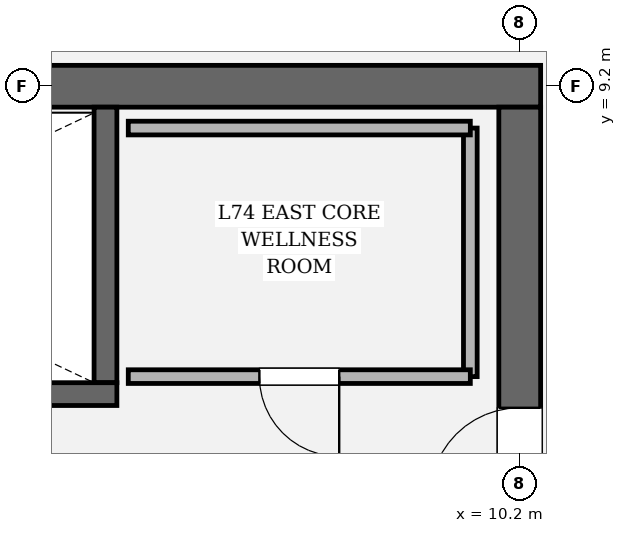
"""IFC4 building model, lengths in metres.
Left out: names, types, materials, properties, quantities, classifications, styles, units other than length and angle.
Written with IfcOpenShell. Run it as: python <this file> out.ifc"""

import sys

from ifc_helpers import new_model, si_unit, direction, frame, frame_2d, origin, place, context, subcontext, project, spatial, rectangle, extrude, element, fill, save


model = new_model("IFC4")
c1 = context("Model", 3, precision=1e-05, world=origin(), true_north=direction((0.0, 1.0)))
c2 = subcontext(c1, "Body", "Model", "MODEL_VIEW")
j1 = project(units=[si_unit("LENGTHUNIT", "METRE"), si_unit("PLANEANGLEUNIT", "RADIAN")], contexts=[c1])
p1 = place(None, origin())
s1 = spatial("IfcSite", under=j1, at=p1, CompositionType="ELEMENT")
p2 = place(p1, origin())
s2 = spatial("IfcBuilding", under=s1, at=p2, CompositionType="ELEMENT")
p3 = place(p2, frame((0.0, 0.0, 313.2)))
s3 = spatial("IfcBuildingStorey", under=s2, at=p3, CompositionType="ELEMENT", Elevation=313.2)
p4 = place(p3, frame((-10.475, 9.2, 0.0), z_axis=(0.0, 0.0, 1.0), x_axis=(1.0, 0.0, 0.0)))
e1 = element("IfcWall", 1, at=p4, inside=s3, PredefinedType="SHEAR", context=c2, shape_type="SweptSolid", body=[
    extrude(rectangle(XDim=20.95, YDim=0.55, at=frame_2d((10.475, 0.0))), origin(), (0.0, 0.0, 1.0), 4.2),
])
p5 = place(p3, frame((10.2, 8.925, 0.0), z_axis=(0.0, 0.0, 1.0), x_axis=(0.0, -1.0, 0.0)))
e2 = element("IfcWall", 2, at=p5, inside=s3, PredefinedType="SHEAR", context=c2, shape_type="SweptSolid", body=[
    extrude(rectangle(XDim=17.85, YDim=0.55, at=frame_2d((8.925, 0.0))), origin(), (0.0, 0.0, 1.0), 4.2),
])
p6 = place(p5, frame((3.955, 0.0, 0.0)))
e3 = element("IfcOpeningElement", 3, at=p6, cuts=e2, PredefinedType="OPENING", context=c2, shape_type="SweptSolid", body=[
    extrude(rectangle(XDim=1.18, YDim=2.2, at=frame_2d((0.59, 1.1))), frame((0.0, 0.285, 0.0), z_axis=(0.0, -1.0, 0.0), x_axis=(1.0, 0.0, 0.0)), (0.0, 0.0, 1.0), 0.57),
])
p7 = place(p3, frame((4.75, 8.925, 0.0), z_axis=(0.0, 0.0, 1.0), x_axis=(0.0, -1.0, 0.0)))
e4 = element("IfcWall", 4, at=p7, inside=s3, PredefinedType="SOLIDWALL", context=c2, shape_type="SweptSolid", body=[
    extrude(rectangle(XDim=3.625, YDim=0.3, at=frame_2d((1.812, 0.0))), origin(), (0.0, 0.0, 1.0), 4.2),
])
p8 = place(p3, frame((-4.9, 5.15, 0.0), z_axis=(0.0, 0.0, 1.0), x_axis=(1.0, 0.0, 0.0)))
e5 = element("IfcWall", 5, at=p8, inside=s3, PredefinedType="SOLIDWALL", context=c2, shape_type="SweptSolid", body=[
    extrude(rectangle(XDim=9.8, YDim=0.3, at=frame_2d((4.9, 0.0))), origin(), (0.0, 0.0, 1.0), 4.2),
])
p9 = place(p8, frame((0.56, 0.0, 0.0)))
e6 = element("IfcOpeningElement", 6, at=p9, cuts=e5, PredefinedType="OPENING", context=c2, shape_type="SweptSolid", body=[
    extrude(rectangle(XDim=1.18, YDim=2.2, at=frame_2d((0.59, 1.1))), frame((0.0, 0.16, 0.0), z_axis=(0.0, -1.0, 0.0), x_axis=(1.0, 0.0, 0.0)), (0.0, 0.0, 1.0), 0.32),
])
p10 = place(p3, frame((9.55, 5.38, 0.0), z_axis=(0.0, 0.0, 1.0), x_axis=(0.0, 1.0, 0.0)))
e7 = element("IfcWall", 7, at=p10, inside=s3, PredefinedType="PARTITIONING", context=c2, shape_type="SweptSolid", body=[
    extrude(rectangle(XDim=3.27, YDim=0.18, at=frame_2d((1.635, 0.0))), origin(), (0.0, 0.0, 1.0), 3.92),
])
p11 = place(p3, frame((9.55, 8.65, 0.0), z_axis=(0.0, 0.0, 1.0), x_axis=(-1.0, 0.0, 0.0)))
e8 = element("IfcWall", 8, at=p11, inside=s3, PredefinedType="PARTITIONING", context=c2, shape_type="SweptSolid", body=[
    extrude(rectangle(XDim=4.5, YDim=0.18, at=frame_2d((2.25, 0.0))), origin(), (0.0, 0.0, 1.0), 3.92),
])
p12 = place(p3, frame((5.05, 5.38, 0.0), z_axis=(0.0, 0.0, 1.0), x_axis=(1.0, 0.0, 0.0)))
e9 = element("IfcWall", 9, at=p12, inside=s3, PredefinedType="PARTITIONING", context=c2, shape_type="SweptSolid", body=[
    extrude(rectangle(XDim=4.5, YDim=0.18, at=frame_2d((2.25, 0.0))), origin(), (0.0, 0.0, 1.0), 3.92),
])
p13 = place(p12, frame((1.725, 0.0, 0.0)))
e10 = element("IfcOpeningElement", 10, at=p13, cuts=e9, PredefinedType="OPENING", context=c2, shape_type="SweptSolid", body=[
    extrude(rectangle(XDim=1.05, YDim=2.2, at=frame_2d((0.525, 1.1))), frame((0.0, 0.1, 0.0), z_axis=(0.0, -1.0, 0.0), x_axis=(1.0, 0.0, 0.0)), (0.0, 0.0, 1.0), 0.2),
])
p14 = place(p6, origin())
e11 = element("IfcDoor", 11, at=p14, inside=s3, OperationType="SINGLE_SWING_RIGHT", PredefinedType="DOOR", context=c2, shape_type="SweptSolid", body=[
    extrude(rectangle(XDim=1.18, YDim=2.2, at=frame_2d((0.59, 1.1))), frame((0.0, 0.025, 0.0), z_axis=(0.0, -1.0, 0.0), x_axis=(1.0, 0.0, 0.0)), (0.0, 0.0, 1.0), 0.05),
])
fill(e3, e11)
p15 = place(p13, origin())
e12 = element("IfcDoor", 12, at=p15, inside=s3, OperationType="SINGLE_SWING_RIGHT", PredefinedType="DOOR", context=c2, shape_type="SweptSolid", body=[
    extrude(rectangle(XDim=1.05, YDim=2.2, at=frame_2d((0.525, 1.1))), frame((0.0, 0.025, 0.0), z_axis=(0.0, -1.0, 0.0), x_axis=(1.0, 0.0, 0.0)), (0.0, 0.0, 1.0), 0.05),
])
fill(e10, e12)
save(model, sys.argv[1])
